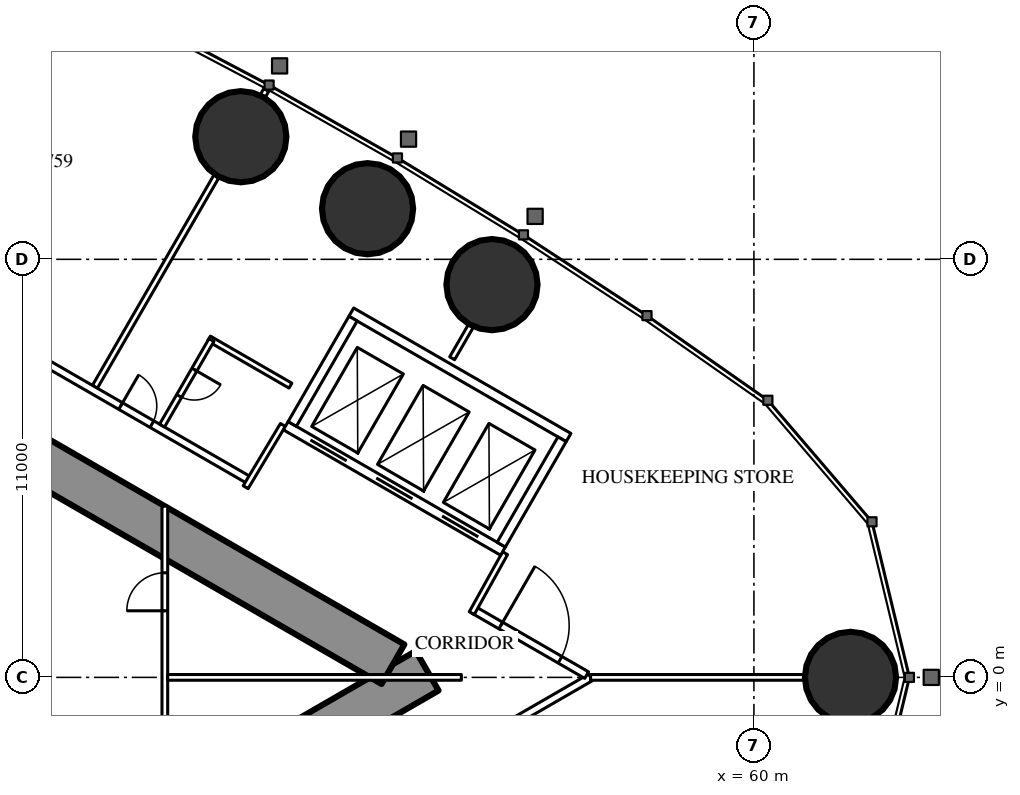
"""IFC4 building model, lengths in metres.
Left out: names, types, materials, properties, quantities, classifications, styles, units other than length and angle.
Written with IfcOpenShell. Run it as: python <this file> out.ifc"""

import sys

from ifc_helpers import new_model, si_unit, direction, frame, frame_2d, origin, origin_2d, place, context, subcontext, project, spatial, rectangle, circle, extrude, element, fill, save


model = new_model("IFC4")
c1 = context("Model", 3, precision=1e-05, world=origin(), true_north=direction((0.0, 1.0)))
c2 = subcontext(c1, "Body", "Model", "MODEL_VIEW")
j1 = project(units=[si_unit("LENGTHUNIT", "METRE"), si_unit("PLANEANGLEUNIT", "RADIAN")], contexts=[c1])
p1 = place(None, origin())
s1 = spatial("IfcSite", under=j1, at=p1, CompositionType="ELEMENT")
p2 = place(p1, origin())
s2 = spatial("IfcBuilding", under=s1, at=p2, CompositionType="ELEMENT")
p3 = place(p2, frame((0.0, 0.0, 215.3)))
s3 = spatial("IfcBuildingStorey", under=s2, at=p3, CompositionType="ELEMENT", Elevation=215.3)
for number, where, z_axis, x_axis in (
    (1, (62.542, 0.0, 0.0), (0.0, 0.0, 1.0), (1.0, 0.0, 0.0)),
    (2, (53.108, 10.334, 0.0), (0.0, 0.0, 1.0), (1.0, 0.0, 0.0)),
    (3, (49.834, 12.332, 0.0), (0.0, 0.0, 1.0), (1.0, 0.0, 0.0)),
    (4, (46.499, 14.226, 0.0), (0.0, 0.0, 1.0), (1.0, 0.0, 0.0)),
):
    element("IfcColumn", number, at=place(p3, frame(where, z_axis=z_axis, x_axis=x_axis)), inside=s3, PredefinedType="COLUMN", context=c2, shape_type="SweptSolid", body=[
        extrude(circle(Radius=1.2, at=origin_2d()), origin(), (0.0, 0.0, 1.0), 3.6),
    ])
p4 = place(p3, frame((27.2, -13.8, 0.0), z_axis=(0.0, 0.0, 1.0), x_axis=(0.866027159892, 0.499996958321, 0.0)))
e5 = element("IfcWall", 5, at=p4, inside=s3, PredefinedType="SHEAR", context=c2, shape_type="SweptSolid", body=[
    extrude(rectangle(XDim=27.947, YDim=1.2, at=frame_2d((13.973, 0.0))), origin(), (0.0, 0.0, 1.0), 3.6),
])
p5 = place(p4, frame((4.6, 0.0, 0.0)))
e6 = element("IfcOpeningElement", 6, at=p5, cuts=e5, PredefinedType="OPENING", context=c2, shape_type="SweptSolid", body=[
    extrude(rectangle(XDim=1.0, YDim=2.2, at=frame_2d((0.5, 1.1))), frame((0.0, 0.61, 0.0), z_axis=(0.0, -1.0, 0.0), x_axis=(1.0, 0.0, 0.0)), (0.0, 0.0, 1.0), 1.22),
])
p6 = place(p4, frame((13.395, 0.0, 0.0)))
e7 = element("IfcOpeningElement", 7, at=p6, cuts=e5, PredefinedType="OPENING", context=c2, shape_type="SweptSolid", body=[
    extrude(rectangle(XDim=1.8, YDim=2.2, at=frame_2d((0.9, 1.1))), frame((0.0, 0.61, 0.0), z_axis=(0.0, -1.0, 0.0), x_axis=(1.0, 0.0, 0.0)), (0.0, 0.0, 1.0), 1.22),
])
p7 = place(p3, frame((27.2, 13.8, 0.0), z_axis=(0.0, 0.0, 1.0), x_axis=(0.866024515034, -0.500001539357, 0.0)))
e8 = element("IfcWall", 8, at=p7, inside=s3, PredefinedType="SHEAR", context=c2, shape_type="SweptSolid", body=[
    extrude(rectangle(XDim=26.907, YDim=1.2, at=frame_2d((13.454, 0.0))), origin(), (0.0, 0.0, 1.0), 3.6),
])
p8 = place(p7, frame((4.6, 0.0, 0.0)))
e9 = element("IfcOpeningElement", 9, at=p8, cuts=e8, PredefinedType="OPENING", context=c2, shape_type="SweptSolid", body=[
    extrude(rectangle(XDim=1.0, YDim=2.2, at=frame_2d((0.5, 1.1))), frame((0.0, 0.61, 0.0), z_axis=(0.0, -1.0, 0.0), x_axis=(1.0, 0.0, 0.0)), (0.0, 0.0, 1.0), 1.22),
])
p9 = place(p7, frame((13.395, 0.0, 0.0)))
e10 = element("IfcOpeningElement", 10, at=p9, cuts=e8, PredefinedType="OPENING", context=c2, shape_type="SweptSolid", body=[
    extrude(rectangle(XDim=1.8, YDim=2.2, at=frame_2d((0.9, 1.1))), frame((0.0, 0.61, 0.0), z_axis=(0.0, -1.0, 0.0), x_axis=(1.0, 0.0, 0.0)), (0.0, 0.0, 1.0), 1.22),
])
p10 = place(p3, frame((28.959, -15.44, 0.0), z_axis=(0.0, 0.0, 1.0), x_axis=(0.866025227435, 0.500000305447, 0.0)))
e11 = element("IfcWall", 11, at=p10, inside=s3, PredefinedType="PARTITIONING", context=c2, shape_type="SweptSolid", body=[
    extrude(rectangle(XDim=30.88, YDim=0.2, at=frame_2d((15.44, 0.0))), origin(), (0.0, 0.0, 1.0), 3.35),
])
p11 = place(p10, frame((0.494, 0.0, 0.0)))
e12 = element("IfcOpeningElement", 12, at=p11, cuts=e11, PredefinedType="OPENING", context=c2, shape_type="SweptSolid", body=[
    extrude(rectangle(XDim=1.8, YDim=2.2, at=frame_2d((0.9, 1.1))), frame((0.0, 0.11, 0.0), z_axis=(0.0, -1.0, 0.0), x_axis=(1.0, 0.0, 0.0)), (0.0, 0.0, 1.0), 0.22),
])
p12 = place(p10, frame((7.687, 0.0, 0.0)))
e13 = element("IfcOpeningElement", 13, at=p12, cuts=e11, PredefinedType="OPENING", context=c2, shape_type="SweptSolid", body=[
    extrude(rectangle(XDim=1.0, YDim=2.2, at=frame_2d((0.5, 1.1))), frame((0.0, 0.11, 0.0), z_axis=(0.0, -1.0, 0.0), x_axis=(1.0, 0.0, 0.0)), (0.0, 0.0, 1.0), 0.22),
])
p13 = place(p10, frame((16.137, 0.0, 0.0)))
e14 = element("IfcOpeningElement", 14, at=p13, cuts=e11, PredefinedType="OPENING", context=c2, shape_type="SweptSolid", body=[
    extrude(rectangle(XDim=0.95, YDim=2.2, at=frame_2d((0.475, 1.1))), frame((0.0, 0.11, 0.0), z_axis=(0.0, -1.0, 0.0), x_axis=(1.0, 0.0, 0.0)), (0.0, 0.0, 1.0), 0.22),
])
p14 = place(p10, frame((20.021, 0.0, 0.0)))
e15 = element("IfcOpeningElement", 15, at=p14, cuts=e11, PredefinedType="OPENING", context=c2, shape_type="SweptSolid", body=[
    extrude(rectangle(XDim=0.95, YDim=2.2, at=frame_2d((0.475, 1.1))), frame((0.0, 0.11, 0.0), z_axis=(0.0, -1.0, 0.0), x_axis=(1.0, 0.0, 0.0)), (0.0, 0.0, 1.0), 0.22),
])
p15 = place(p10, frame((26.253, 0.0, 0.0)))
e16 = element("IfcOpeningElement", 16, at=p15, cuts=e11, PredefinedType="OPENING", context=c2, shape_type="SweptSolid", body=[
    extrude(rectangle(XDim=0.95, YDim=2.2, at=frame_2d((0.475, 1.1))), frame((0.0, 0.11, 0.0), z_axis=(0.0, -1.0, 0.0), x_axis=(1.0, 0.0, 0.0)), (0.0, 0.0, 1.0), 0.22),
])
p16 = place(p3, frame((42.66, 7.646, 0.0), z_axis=(0.0, 0.0, 1.0), x_axis=(0.499996592859, 0.866027370889, 0.0)))
e17 = element("IfcWall", 17, at=p16, inside=s3, PredefinedType="PARTITIONING", context=c2, shape_type="SweptSolid", body=[
    extrude(rectangle(XDim=6.398, YDim=0.15, at=frame_2d((3.199, 0.0))), origin(), (0.0, 0.0, 1.0), 2.45),
])
p17 = place(p3, frame((47.079, 15.3, 0.0), z_axis=(0.0, 0.0, 1.0), x_axis=(0.499212083968, 0.866479829667, 0.0)))
e18 = element("IfcWall", 18, at=p17, inside=s3, PredefinedType="PARTITIONING", context=c2, shape_type="SweptSolid", body=[
    extrude(rectangle(XDim=0.179, YDim=0.15, at=frame_2d((0.09, 0.0))), origin(), (0.0, 0.0, 1.0), 2.45),
])
p18 = place(p3, frame((55.702, 0.0, 0.0), z_axis=(0.0, 0.0, 1.0), x_axis=(1.0, 0.0, 0.0)))
e19 = element("IfcWall", 19, at=p18, inside=s3, PredefinedType="PARTITIONING", context=c2, shape_type="SweptSolid", body=[
    extrude(rectangle(XDim=5.619, YDim=0.15, at=frame_2d((2.81, 0.0))), origin(), (0.0, 0.0, 1.0), 2.45),
])
p19 = place(p3, frame((52.06, 8.396, 0.0), z_axis=(0.0, 0.0, 1.0), x_axis=(0.500095379624, 0.865970329329, 0.0)))
e20 = element("IfcWall", 20, at=p19, inside=s3, PredefinedType="PARTITIONING", context=c2, shape_type="SweptSolid", body=[
    extrude(rectangle(XDim=0.982, YDim=0.15, at=frame_2d((0.491, 0.0))), origin(), (0.0, 0.0, 1.0), 3.35),
])
p20 = place(p3, frame((28.959, 15.44, 0.0), z_axis=(0.0, 0.0, 1.0), x_axis=(0.866028936079, -0.499993881836, 0.0)))
e21 = element("IfcWall", 21, at=p20, inside=s3, PredefinedType="PARTITIONING", context=c2, shape_type="SweptSolid", body=[
    extrude(rectangle(XDim=20.503, YDim=0.2, at=frame_2d((10.251, 0.0))), origin(), (0.0, 0.0, 1.0), 3.35),
])
p21 = place(p20, frame((16.603, 0.0, 0.0)))
e22 = element("IfcOpeningElement", 22, at=p21, cuts=e21, PredefinedType="OPENING", context=c2, shape_type="SweptSolid", body=[
    extrude(rectangle(XDim=0.95, YDim=2.2, at=frame_2d((0.475, 1.1))), frame((0.0, 0.11, 0.0), z_axis=(0.0, -1.0, 0.0), x_axis=(1.0, 0.0, 0.0)), (0.0, 0.0, 1.0), 0.22),
])
p22 = place(p20, frame((7.287, 0.0, 0.0)))
e23 = element("IfcOpeningElement", 23, at=p22, cuts=e21, PredefinedType="OPENING", context=c2, shape_type="SweptSolid", body=[
    extrude(rectangle(XDim=0.95, YDim=2.2, at=frame_2d((0.475, 1.1))), frame((0.0, 0.11, 0.0), z_axis=(0.0, -1.0, 0.0), x_axis=(1.0, 0.0, 0.0)), (0.0, 0.0, 1.0), 0.22),
])
p23 = place(p20, frame((2.244, 0.0, 0.0)))
e24 = element("IfcOpeningElement", 24, at=p23, cuts=e21, PredefinedType="OPENING", context=c2, shape_type="SweptSolid", body=[
    extrude(rectangle(XDim=1.8, YDim=2.2, at=frame_2d((0.9, 1.1))), frame((0.0, 0.11, 0.0), z_axis=(0.0, -1.0, 0.0), x_axis=(1.0, 0.0, 0.0)), (0.0, 0.0, 1.0), 0.22),
])
p24 = place(p3, frame((52.639, 1.769, 0.0), z_axis=(0.0, 0.0, 1.0), x_axis=(0.866027340901, -0.4999966448, 0.0)))
e25 = element("IfcWall", 25, at=p24, inside=s3, PredefinedType="PARTITIONING", context=c2, shape_type="SweptSolid", body=[
    extrude(rectangle(XDim=3.417, YDim=0.2, at=frame_2d((1.708, 0.0))), origin(), (0.0, 0.0, 1.0), 3.35),
])
p25 = place(p24, frame((0.809, 0.0, 0.0)))
e26 = element("IfcOpeningElement", 26, at=p25, cuts=e25, PredefinedType="OPENING", context=c2, shape_type="SweptSolid", body=[
    extrude(rectangle(XDim=1.8, YDim=2.2, at=frame_2d((0.9, 1.1))), frame((0.0, 0.11, 0.0), z_axis=(0.0, -1.0, 0.0), x_axis=(1.0, 0.0, 0.0)), (0.0, 0.0, 1.0), 0.22),
])
p26 = place(p3, frame((47.606, 6.642, 0.0), z_axis=(0.0, 0.0, 1.0), x_axis=(-0.51353662755, -0.858067673418, 0.0)))
e27 = element("IfcWall", 27, at=p26, inside=s3, PredefinedType="PARTITIONING", context=c2, shape_type="SweptSolid", body=[
    extrude(rectangle(XDim=1.91, YDim=0.15, at=frame_2d((0.955, 0.0))), origin(), (0.0, 0.0, 1.0), 3.35),
])
p27 = place(p3, frame((52.576, 1.689, 0.0), z_axis=(0.0, 0.0, 1.0), x_axis=(0.485424724123, 0.874278466629, 0.0)))
e28 = element("IfcWall", 28, at=p27, inside=s3, PredefinedType="PARTITIONING", context=c2, shape_type="SweptSolid", body=[
    extrude(rectangle(XDim=1.805, YDim=0.15, at=frame_2d((0.903, 0.0))), origin(), (0.0, 0.0, 1.0), 3.35),
])
p28 = place(p3, frame((45.662, 8.914, 0.0), z_axis=(0.0, 0.0, 1.0), x_axis=(0.86604923931, -0.499958713387, 0.0)))
e29 = element("IfcWall", 29, at=p28, inside=s3, PredefinedType="PARTITIONING", context=c2, shape_type="SweptSolid", body=[
    extrude(rectangle(XDim=2.475, YDim=0.15, at=frame_2d((1.237, 0.0))), origin(), (0.0, 0.0, 1.0), 3.35),
])
p29 = place(p3, frame((44.427, 6.625, 0.0), z_axis=(0.0, 0.0, 1.0), x_axis=(0.500006934395, 0.866021400173, 0.0)))
e30 = element("IfcWall", 30, at=p29, inside=s3, PredefinedType="PARTITIONING", context=c2, shape_type="SweptSolid", body=[
    extrude(rectangle(XDim=2.6, YDim=0.15, at=frame_2d((1.3, 0.0))), origin(), (0.0, 0.0, 1.0), 3.35),
])
p30 = place(p29, frame((0.9, 0.0, 0.0)))
e31 = element("IfcOpeningElement", 31, at=p30, cuts=e30, PredefinedType="OPENING", context=c2, shape_type="SweptSolid", body=[
    extrude(rectangle(XDim=0.8, YDim=2.2, at=frame_2d((0.4, 1.1))), frame((0.0, 0.085, 0.0), z_axis=(0.0, -1.0, 0.0), x_axis=(1.0, 0.0, 0.0)), (0.0, 0.0, 1.0), 0.17),
])
p31 = place(p3, frame((44.5, -4.505, 0.0), z_axis=(0.0, 0.0, 1.0), x_axis=(0.0, 1.0, 0.0)))
e32 = element("IfcWall", 32, at=p31, inside=s3, PredefinedType="PARTITIONING", context=c2, shape_type="SweptSolid", body=[
    extrude(rectangle(XDim=9.009, YDim=0.15, at=frame_2d((4.505, 0.0))), origin(), (0.0, 0.0, 1.0), 3.35),
])
p32 = place(p31, frame((1.752, 0.0, 0.0)))
e33 = element("IfcOpeningElement", 33, at=p32, cuts=e32, PredefinedType="OPENING", context=c2, shape_type="SweptSolid", body=[
    extrude(rectangle(XDim=1.0, YDim=2.2, at=frame_2d((0.5, 1.1))), frame((0.0, 0.085, 0.0), z_axis=(0.0, -1.0, 0.0), x_axis=(1.0, 0.0, 0.0)), (0.0, 0.0, 1.0), 0.17),
])
p33 = place(p31, frame((6.257, 0.0, 0.0)))
e34 = element("IfcOpeningElement", 34, at=p33, cuts=e32, PredefinedType="OPENING", context=c2, shape_type="SweptSolid", body=[
    extrude(rectangle(XDim=1.0, YDim=2.2, at=frame_2d((0.5, 1.1))), frame((0.0, 0.085, 0.0), z_axis=(0.0, -1.0, 0.0), x_axis=(1.0, 0.0, 0.0)), (0.0, 0.0, 1.0), 0.17),
])
p34 = place(p3, frame((44.575, 0.0, 0.0), z_axis=(0.0, 0.0, 1.0), x_axis=(1.0, 0.0, 0.0)))
e35 = element("IfcWall", 35, at=p34, inside=s3, PredefinedType="PARTITIONING", context=c2, shape_type="SweptSolid", body=[
    extrude(rectangle(XDim=7.727, YDim=0.15, at=frame_2d((3.864, 0.0))), origin(), (0.0, 0.0, 1.0), 2.45),
])
p35 = place(p3, frame((47.681, 6.622, 0.0), z_axis=(0.0, 0.0, 1.0), x_axis=(0.86603344179, -0.499986077507, 0.0)))
e36 = element("IfcWall", 36, at=p35, inside=s3, PredefinedType="PARTITIONING", context=c2, shape_type="SweptSolid", body=[
    extrude(rectangle(XDim=6.6, YDim=0.25, at=frame_2d((3.3, 0.0))), origin(), (0.0, 0.0, 1.0), 3.35),
])
p36 = place(p35, frame((0.75, 0.0, 0.0)))
e37 = element("IfcOpeningElement", 37, at=p36, cuts=e36, PredefinedType="OPENING", context=c2, shape_type="SweptSolid", body=[
    extrude(rectangle(XDim=1.1, YDim=2.2, at=frame_2d((0.55, 1.1))), frame((0.0, 0.135, 0.0), z_axis=(0.0, -1.0, 0.0), x_axis=(1.0, 0.0, 0.0)), (0.0, 0.0, 1.0), 0.27),
])
p37 = place(p35, frame((2.75, 0.0, 0.0)))
e38 = element("IfcOpeningElement", 38, at=p37, cuts=e36, PredefinedType="OPENING", context=c2, shape_type="SweptSolid", body=[
    extrude(rectangle(XDim=1.1, YDim=2.2, at=frame_2d((0.55, 1.1))), frame((0.0, 0.135, 0.0), z_axis=(0.0, -1.0, 0.0), x_axis=(1.0, 0.0, 0.0)), (0.0, 0.0, 1.0), 0.27),
])
p38 = place(p35, frame((4.75, 0.0, 0.0)))
e39 = element("IfcOpeningElement", 39, at=p38, cuts=e36, PredefinedType="OPENING", context=c2, shape_type="SweptSolid", body=[
    extrude(rectangle(XDim=1.1, YDim=2.2, at=frame_2d((0.55, 1.1))), frame((0.0, 0.135, 0.0), z_axis=(0.0, -1.0, 0.0), x_axis=(1.0, 0.0, 0.0)), (0.0, 0.0, 1.0), 0.27),
])
p39 = place(p3, frame((49.406, 9.611, 0.0), z_axis=(0.0, 0.0, 1.0), x_axis=(0.86603344179, -0.499986077507, 0.0)))
e40 = element("IfcWall", 40, at=p39, inside=s3, PredefinedType="PARTITIONING", context=c2, shape_type="SweptSolid", body=[
    extrude(rectangle(XDim=6.6, YDim=0.25, at=frame_2d((3.3, 0.0))), origin(), (0.0, 0.0, 1.0), 3.35),
])
p40 = place(p3, frame((47.852, 6.668, 0.0), z_axis=(0.0, 0.0, 1.0), x_axis=(0.499929347863, 0.866066190972, 0.0)))
e41 = element("IfcWall", 41, at=p40, inside=s3, PredefinedType="PARTITIONING", context=c2, shape_type="SweptSolid", body=[
    extrude(rectangle(XDim=3.201, YDim=0.25, at=frame_2d((1.6, 0.0))), origin(), (0.0, 0.0, 1.0), 3.35),
])
p41 = place(p3, frame((53.352, 3.493, 0.0), z_axis=(0.0, 0.0, 1.0), x_axis=(0.499872130319, 0.866099216793, 0.0)))
e42 = element("IfcWall", 42, at=p41, inside=s3, PredefinedType="PARTITIONING", context=c2, shape_type="SweptSolid", body=[
    extrude(rectangle(XDim=3.2, YDim=0.25, at=frame_2d((1.6, 0.0))), origin(), (0.0, 0.0, 1.0), 3.35),
])
p42 = place(p30, origin())
e43 = element("IfcDoor", 43, at=p42, inside=s3, OperationType="SINGLE_SWING_RIGHT", PredefinedType="DOOR", context=c2, shape_type="SweptSolid", body=[
    extrude(rectangle(XDim=0.8, YDim=2.2, at=frame_2d((0.4, 1.1))), frame((0.0, 0.025, 0.0), z_axis=(0.0, -1.0, 0.0), x_axis=(1.0, 0.0, 0.0)), (0.0, 0.0, 1.0), 0.05),
])
fill(e31, e43)
p43 = place(p21, origin())
e44 = element("IfcDoor", 44, at=p43, inside=s3, OperationType="SINGLE_SWING_LEFT", PredefinedType="DOOR", context=c2, shape_type="SweptSolid", body=[
    extrude(rectangle(XDim=0.95, YDim=2.2, at=frame_2d((0.475, 1.1))), frame((0.0, 0.025, 0.0), z_axis=(0.0, -1.0, 0.0), x_axis=(1.0, 0.0, 0.0)), (0.0, 0.0, 1.0), 0.05),
])
fill(e22, e44)
p44 = place(p25, origin())
e45 = element("IfcDoor", 45, at=p44, inside=s3, OperationType="DOUBLE_DOOR_SINGLE_SWING", PredefinedType="DOOR", context=c2, shape_type="SweptSolid", body=[
    extrude(rectangle(XDim=1.8, YDim=2.2, at=frame_2d((0.9, 1.1))), frame((0.0, 0.025, 0.0), z_axis=(0.0, -1.0, 0.0), x_axis=(1.0, 0.0, 0.0)), (0.0, 0.0, 1.0), 0.05),
])
fill(e26, e45)
p45 = place(p33, origin())
e46 = element("IfcDoor", 46, at=p45, inside=s3, OperationType="SINGLE_SWING_LEFT", PredefinedType="DOOR", context=c2, shape_type="SweptSolid", body=[
    extrude(rectangle(XDim=1.0, YDim=2.2, at=frame_2d((0.5, 1.1))), frame((0.0, 0.025, 0.0), z_axis=(0.0, -1.0, 0.0), x_axis=(1.0, 0.0, 0.0)), (0.0, 0.0, 1.0), 0.05),
])
fill(e34, e46)
p46 = place(p36, origin())
e47 = element("IfcDoor", 47, at=p46, inside=s3, OperationType="DOUBLE_DOOR_SLIDING", PredefinedType="USERDEFINED", context=c2, shape_type="SweptSolid", body=[
    extrude(rectangle(XDim=1.1, YDim=2.2, at=frame_2d((0.55, 1.1))), frame((0.0, 0.025, 0.0), z_axis=(0.0, -1.0, 0.0), x_axis=(1.0, 0.0, 0.0)), (0.0, 0.0, 1.0), 0.05),
])
fill(e37, e47)
p47 = place(p37, origin())
e48 = element("IfcDoor", 48, at=p47, inside=s3, OperationType="DOUBLE_DOOR_SLIDING", PredefinedType="USERDEFINED", context=c2, shape_type="SweptSolid", body=[
    extrude(rectangle(XDim=1.1, YDim=2.2, at=frame_2d((0.55, 1.1))), frame((0.0, 0.025, 0.0), z_axis=(0.0, -1.0, 0.0), x_axis=(1.0, 0.0, 0.0)), (0.0, 0.0, 1.0), 0.05),
])
fill(e38, e48)
p48 = place(p38, origin())
e49 = element("IfcDoor", 49, at=p48, inside=s3, OperationType="DOUBLE_DOOR_SLIDING", PredefinedType="USERDEFINED", context=c2, shape_type="SweptSolid", body=[
    extrude(rectangle(XDim=1.1, YDim=2.2, at=frame_2d((0.55, 1.1))), frame((0.0, 0.025, 0.0), z_axis=(0.0, -1.0, 0.0), x_axis=(1.0, 0.0, 0.0)), (0.0, 0.0, 1.0), 0.05),
])
fill(e39, e49)
save(model, sys.argv[1])
